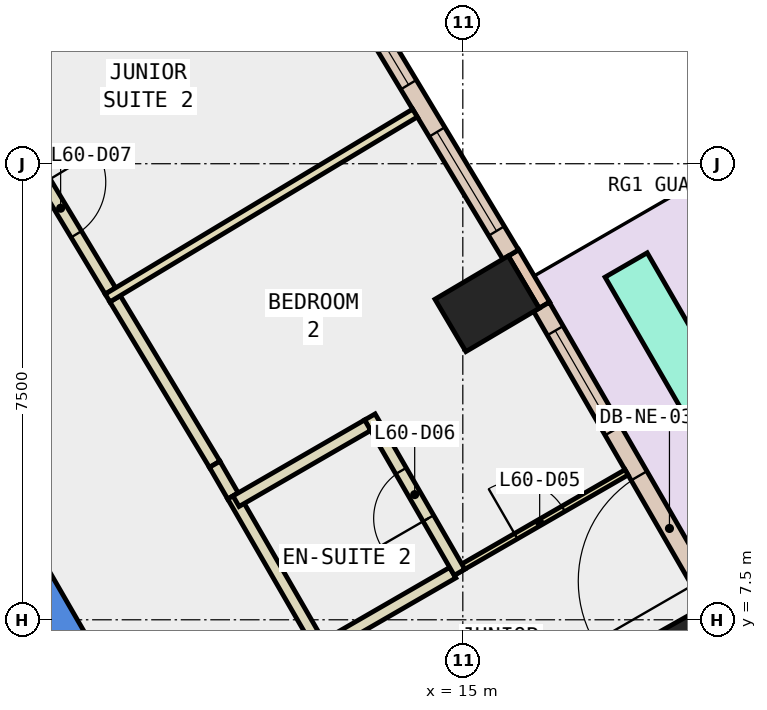
"""IFC4 building model, lengths in metres.
Left out: names, types, materials, properties, quantities, classifications, styles, units other than length and angle.
Written with IfcOpenShell. Run it as: python <this file> out.ifc"""

import sys

from ifc_helpers import new_model, si_unit, direction, frame, frame_2d, origin, origin_2d, place, context, subcontext, project, spatial, polyline, rectangle, outline, extrude, element, fill, save


model = new_model("IFC4")
c1 = context("Model", 3, precision=1e-05, world=origin(), true_north=direction((0.0, 1.0)))
c2 = subcontext(c1, "Body", "Model", "MODEL_VIEW")
j1 = project(units=[si_unit("LENGTHUNIT", "METRE"), si_unit("PLANEANGLEUNIT", "RADIAN")], contexts=[c1])
p1 = place(None, origin())
s1 = spatial("IfcSite", under=j1, at=p1, CompositionType="ELEMENT")
p2 = place(p1, origin())
s2 = spatial("IfcBuilding", under=s1, at=p2, CompositionType="ELEMENT")
p3 = place(p2, frame((0.0, 0.0, 263.0)))
s3 = spatial("IfcBuildingStorey", under=s2, at=p3, CompositionType="ELEMENT", Elevation=263.0)
for number, where, z_axis, x_axis in (
    (1, (18.696, 6.987, -0.34), (0.0, 0.0, 1.0), (-0.491, 0.871, 0.0)),
    (2, (15.399, 12.697, -0.34), (0.0, 0.0, 1.0), (-0.509, 0.861, 0.0)),
):
    element("IfcColumn", number, at=place(p3, frame(where, z_axis=z_axis, x_axis=x_axis)), inside=s3, PredefinedType="COLUMN", context=c2, shape_type="SweptSolid", body=[
        extrude(rectangle(XDim=1.0, YDim=1.4, at=origin_2d()), origin(), (0.0, 0.0, 1.0), 3.6),
    ])
p4 = place(p3, frame((0.0, 0.0, -0.34)))
e3 = element("IfcWall", 3, at=p4, inside=s3, PredefinedType="SHEAR", context=c2, shape_type="SweptSolid", body=[
    extrude(outline(polyline([(6.786, 10.747), (6.266, 10.447), (10.854, 2.5), (11.547, 2.5), (6.786, 10.747)])), origin(), (0.0, 0.0, 1.0), 3.6),
])
p5 = place(p3, frame((16.342, 12.674, 0.0), z_axis=(0.0, 0.0, 1.0), x_axis=(-0.508268432768, 0.861198699634, 0.0)))
e4 = element("IfcWall", 4, at=p5, inside=s3, PredefinedType="STANDARD", context=c2, shape_type="SweptSolid", body=[
    extrude(rectangle(XDim=1.0, YDim=0.2, at=frame_2d((0.5, 0.0))), origin(), (0.0, 0.0, 1.0), 3.26),
])
p6 = place(p3, frame((19.1, 7.787, 0.0), z_axis=(0.0, 0.0, 1.0), x_axis=(-0.500041292042, 0.866001562501, 0.0)))
e5 = element("IfcWall", 5, at=p6, inside=s3, PredefinedType="STANDARD", context=c2, shape_type="SweptSolid", body=[
    extrude(rectangle(XDim=5.612, YDim=0.3, at=frame_2d((2.806, 0.0))), origin(), (0.0, 0.0, 1.0), 3.26),
])
p7 = place(p6, frame((0.403, 0.0, 0.0)))
e6 = element("IfcOpeningElement", 6, at=p7, cuts=e5, PredefinedType="OPENING", context=c2, shape_type="SweptSolid", body=[
    extrude(rectangle(XDim=2.0, YDim=2.4, at=frame_2d((1.0, 1.2))), frame((0.0, 0.16, 0.0), z_axis=(0.0, -1.0, 0.0), x_axis=(1.0, 0.0, 0.0)), (0.0, 0.0, 1.0), 0.32),
])
p8 = place(p6, frame((3.259, 0.0, 0.9)))
e7 = element("IfcOpeningElement", 7, at=p8, cuts=e5, PredefinedType="OPENING", context=c2, shape_type="SweptSolid", body=[
    extrude(rectangle(XDim=1.9, YDim=2.0, at=frame_2d((0.95, 1.0))), frame((0.0, 0.16, 0.0), z_axis=(0.0, -1.0, 0.0), x_axis=(1.0, 0.0, 0.0)), (0.0, 0.0, 1.0), 0.32),
])
p9 = place(p3, frame((15.788, 13.506, 0.0), z_axis=(0.0, 0.0, 1.0), x_axis=(-0.515435742129, 0.856928232547, 0.0)))
e8 = element("IfcWall", 8, at=p9, inside=s3, PredefinedType="STANDARD", context=c2, shape_type="SweptSolid", body=[
    extrude(rectangle(XDim=5.613, YDim=0.3, at=frame_2d((2.806, 0.0))), origin(), (0.0, 0.0, 1.0), 3.26),
])
p10 = place(p9, frame((0.453, 0.0, 0.9)))
e9 = element("IfcOpeningElement", 9, at=p10, cuts=e8, PredefinedType="OPENING", context=c2, shape_type="SweptSolid", body=[
    extrude(rectangle(XDim=1.9, YDim=2.0, at=frame_2d((0.95, 1.0))), frame((0.0, 0.16, 0.0), z_axis=(0.0, -1.0, 0.0), x_axis=(1.0, 0.0, 0.0)), (0.0, 0.0, 1.0), 0.32),
])
p11 = place(p9, frame((3.26, 0.0, 0.9)))
e10 = element("IfcOpeningElement", 10, at=p11, cuts=e8, PredefinedType="OPENING", context=c2, shape_type="SweptSolid", body=[
    extrude(rectangle(XDim=1.9, YDim=2.0, at=frame_2d((0.95, 1.0))), frame((0.0, 0.16, 0.0), z_axis=(0.0, -1.0, 0.0), x_axis=(1.0, 0.0, 0.0)), (0.0, 0.0, 1.0), 0.32),
])
p12 = place(p3, frame((20.392, 8.649, 0.0), z_axis=(0.0, 0.0, 1.0), x_axis=(-0.500079142514, 0.865979706011, 0.0)))
e11 = element("IfcWall", 11, at=p12, inside=s3, PredefinedType="STANDARD", context=c2, shape_type="SweptSolid", body=[
    extrude(rectangle(XDim=5.411, YDim=0.8, at=frame_2d((2.706, 0.0))), origin(), (0.0, 0.0, 1.0), 0.8),
])
p13 = place(p3, frame((9.281, 12.779, 0.0), z_axis=(0.0, 0.0, 1.0), x_axis=(0.515568955032, -0.856848091908, 0.0)))
e12 = element("IfcWall", 12, at=p13, inside=s3, PredefinedType="PARTITIONING", context=c2, shape_type="SweptSolid", body=[
    extrude(rectangle(XDim=3.177, YDim=0.2, at=frame_2d((1.588, 0.0))), origin(), (0.0, 0.0, 1.0), 3.26),
])
p14 = place(p3, frame((10.919, 10.057, 0.0), z_axis=(0.0, 0.0, 1.0), x_axis=(0.500284357783, -0.865861167485, 0.0)))
e13 = element("IfcWall", 13, at=p14, inside=s3, PredefinedType="PARTITIONING", context=c2, shape_type="SweptSolid", body=[
    extrude(rectangle(XDim=0.602, YDim=0.2, at=frame_2d((0.301, 0.0))), origin(), (0.0, 0.0, 1.0), 3.26),
])
p15 = place(p3, frame((11.22, 9.536, 0.0), z_axis=(0.0, 0.0, 1.0), x_axis=(0.500049511043, -0.865996816683, 0.0)))
e14 = element("IfcWall", 14, at=p15, inside=s3, PredefinedType="PARTITIONING", context=c2, shape_type="SweptSolid", body=[
    extrude(rectangle(XDim=2.8, YDim=0.2, at=frame_2d((1.4, 0.0))), origin(), (0.0, 0.0, 1.0), 3.26),
])
p16 = place(p3, frame((7.567, 15.629, 0.0), z_axis=(0.0, 0.0, 1.0), x_axis=(0.51556943596, -0.856847802532, 0.0)))
e15 = element("IfcWall", 15, at=p16, inside=s3, PredefinedType="PARTITIONING", context=c2, shape_type="SweptSolid", body=[
    extrude(rectangle(XDim=3.176, YDim=0.2, at=frame_2d((1.588, 0.0))), origin(), (0.0, 0.0, 1.0), 3.26),
])
p17 = place(p16, frame((1.088, 0.0, 0.0)))
e16 = element("IfcOpeningElement", 16, at=p17, cuts=e15, PredefinedType="OPENING", context=c2, shape_type="SweptSolid", body=[
    extrude(rectangle(XDim=1.0, YDim=2.1, at=frame_2d((0.5, 1.05))), frame((0.0, 0.11, 0.0), z_axis=(0.0, -1.0, 0.0), x_axis=(1.0, 0.0, 0.0)), (0.0, 0.0, 1.0), 0.22),
])
p18 = place(p3, frame((14.835, 8.275, 0.0), z_axis=(0.0, 0.0, 1.0), x_axis=(0.8660266723, 0.49999780286, 0.0)))
e17 = element("IfcWall", 17, at=p18, inside=s3, PredefinedType="PARTITIONING", context=c2, shape_type="SweptSolid", body=[
    extrude(rectangle(XDim=3.3, YDim=0.1, at=frame_2d((1.65, 0.0))), origin(), (0.0, 0.0, 1.0), 3.26),
])
p19 = place(p18, frame((1.2, 0.0, 0.0)))
e18 = element("IfcOpeningElement", 18, at=p19, cuts=e17, PredefinedType="OPENING", context=c2, shape_type="SweptSolid", body=[
    extrude(rectangle(XDim=0.9, YDim=2.1, at=frame_2d((0.45, 1.05))), frame((0.0, 0.06, 0.0), z_axis=(0.0, -1.0, 0.0), x_axis=(1.0, 0.0, 0.0)), (0.0, 0.0, 1.0), 0.12),
])
p20 = place(p3, frame((12.756, 7.075, 0.0), z_axis=(0.0, 0.0, 1.0), x_axis=(0.866075499611, 0.499913221443, 0.0)))
e19 = element("IfcWall", 19, at=p20, inside=s3, PredefinedType="PARTITIONING", context=c2, shape_type="SweptSolid", body=[
    extrude(rectangle(XDim=2.4, YDim=0.2, at=frame_2d((1.2, 0.0))), origin(), (0.0, 0.0, 1.0), 3.26),
])
p21 = place(p3, frame((14.946, 8.281, 0.0), z_axis=(0.0, 0.0, 1.0), x_axis=(-0.500001826776, 0.866024349092, 0.0)))
e20 = element("IfcWall", 20, at=p21, inside=s3, PredefinedType="PARTITIONING", context=c2, shape_type="SweptSolid", body=[
    extrude(rectangle(XDim=2.95, YDim=0.2, at=frame_2d((1.475, 0.0))), origin(), (0.0, 0.0, 1.0), 3.26),
])
p22 = place(p21, frame((1.025, 0.0, 0.0)))
e21 = element("IfcOpeningElement", 21, at=p22, cuts=e20, PredefinedType="OPENING", context=c2, shape_type="SweptSolid", body=[
    extrude(rectangle(XDim=0.9, YDim=2.1, at=frame_2d((0.45, 1.05))), frame((0.0, 0.11, 0.0), z_axis=(0.0, -1.0, 0.0), x_axis=(1.0, 0.0, 0.0)), (0.0, 0.0, 1.0), 0.22),
])
p23 = place(p3, frame((13.435, 10.7, 0.0), z_axis=(0.0, 0.0, 1.0), x_axis=(-0.866022959057, -0.500004234368, 0.0)))
e22 = element("IfcWall", 22, at=p23, inside=s3, PredefinedType="PARTITIONING", context=c2, shape_type="SweptSolid", body=[
    extrude(rectangle(XDim=2.5, YDim=0.2, at=frame_2d((1.25, 0.0))), origin(), (0.0, 0.0, 1.0), 3.26),
])
p24 = place(p3, frame((9.157, 12.792, 0.0), z_axis=(0.0, 0.0, 1.0), x_axis=(0.856933793276, 0.515426497129, 0.0)))
e23 = element("IfcWall", 23, at=p24, inside=s3, PredefinedType="PARTITIONING", context=c2, shape_type="SweptSolid", body=[
    extrude(rectangle(XDim=5.9, YDim=0.15, at=frame_2d((2.95, 0.0))), origin(), (0.0, 0.0, 1.0), 3.26),
])
p25 = place(p3, frame((8.48, 3.412, 0.0), z_axis=(0.0, 0.0, 1.0), x_axis=(-0.499978703459, 0.866037698999, 0.0)))
e24 = element("IfcWall", 24, at=p25, inside=s3, PredefinedType="STANDARD", context=c2, shape_type="SweptSolid", body=[
    extrude(rectangle(XDim=6.9, YDim=0.2, at=frame_2d((3.45, 0.0))), origin(), (0.0, 0.0, 1.0), 3.26),
])
p26 = place(p7, origin())
e25 = element("IfcDoor", 25, at=p26, inside=s3, OperationType="SLIDING_TO_LEFT", PredefinedType="DOOR", context=c2, shape_type="SweptSolid", body=[
    extrude(rectangle(XDim=2.0, YDim=2.4, at=frame_2d((1.0, 1.2))), frame((0.0, 0.025, 0.0), z_axis=(0.0, -1.0, 0.0), x_axis=(1.0, 0.0, 0.0)), (0.0, 0.0, 1.0), 0.05),
])
fill(e6, e25)
p27 = place(p8, origin())
e26 = element("IfcWindow", 26, at=p27, inside=s3, PartitioningType="SINGLE_PANEL", PredefinedType="WINDOW", context=c2, shape_type="SweptSolid", body=[
    extrude(rectangle(XDim=1.9, YDim=2.0, at=frame_2d((0.95, 1.0))), frame((0.0, 0.03, 0.0), z_axis=(0.0, -1.0, 0.0), x_axis=(1.0, 0.0, 0.0)), (0.0, 0.0, 1.0), 0.06),
])
fill(e7, e26)
p28 = place(p10, origin())
e27 = element("IfcWindow", 27, at=p28, inside=s3, PartitioningType="SINGLE_PANEL", PredefinedType="WINDOW", context=c2, shape_type="SweptSolid", body=[
    extrude(rectangle(XDim=1.9, YDim=2.0, at=frame_2d((0.95, 1.0))), frame((0.0, 0.03, 0.0), z_axis=(0.0, -1.0, 0.0), x_axis=(1.0, 0.0, 0.0)), (0.0, 0.0, 1.0), 0.06),
])
fill(e9, e27)
p29 = place(p11, origin())
e28 = element("IfcWindow", 28, at=p29, inside=s3, PartitioningType="SINGLE_PANEL", PredefinedType="WINDOW", context=c2, shape_type="SweptSolid", body=[
    extrude(rectangle(XDim=1.9, YDim=2.0, at=frame_2d((0.95, 1.0))), frame((0.0, 0.03, 0.0), z_axis=(0.0, -1.0, 0.0), x_axis=(1.0, 0.0, 0.0)), (0.0, 0.0, 1.0), 0.06),
])
fill(e10, e28)
p30 = place(p19, origin())
e29 = element("IfcDoor", 29, at=p30, inside=s3, OperationType="SINGLE_SWING_RIGHT", PredefinedType="DOOR", context=c2, shape_type="SweptSolid", body=[
    extrude(rectangle(XDim=0.9, YDim=2.1, at=frame_2d((0.45, 1.05))), frame((0.0, 0.025, 0.0), z_axis=(0.0, -1.0, 0.0), x_axis=(1.0, 0.0, 0.0)), (0.0, 0.0, 1.0), 0.05),
])
fill(e18, e29)
p31 = place(p22, origin())
e30 = element("IfcDoor", 30, at=p31, inside=s3, OperationType="SINGLE_SWING_LEFT", PredefinedType="DOOR", context=c2, shape_type="SweptSolid", body=[
    extrude(rectangle(XDim=0.9, YDim=2.1, at=frame_2d((0.45, 1.05))), frame((0.0, 0.025, 0.0), z_axis=(0.0, -1.0, 0.0), x_axis=(1.0, 0.0, 0.0)), (0.0, 0.0, 1.0), 0.05),
])
fill(e21, e30)
p32 = place(p17, origin())
e31 = element("IfcDoor", 31, at=p32, inside=s3, OperationType="SINGLE_SWING_RIGHT", PredefinedType="DOOR", context=c2, shape_type="SweptSolid", body=[
    extrude(rectangle(XDim=1.0, YDim=2.1, at=frame_2d((0.5, 1.05))), frame((0.0, 0.025, 0.0), z_axis=(0.0, -1.0, 0.0), x_axis=(1.0, 0.0, 0.0)), (0.0, 0.0, 1.0), 0.05),
])
fill(e16, e31)
save(model, sys.argv[1])
